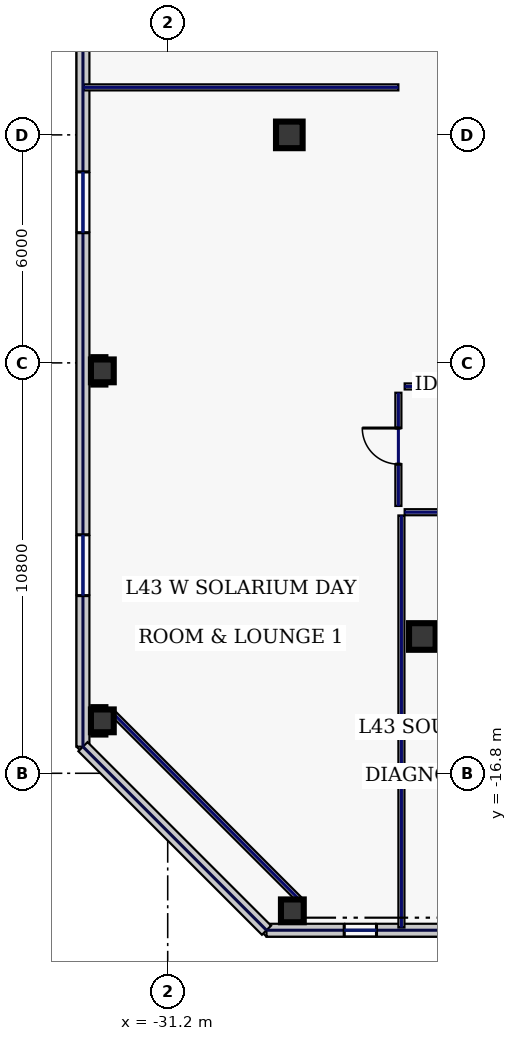
"""IFC4 building model, lengths in metres.
Left out: names, types, materials, properties, quantities, classifications, styles, units other than length and angle.
Written with IfcOpenShell. Run it as: python <this file> out.ifc"""

import sys

from ifc_helpers import new_model, si_unit, direction, frame, frame_2d, origin, origin_2d, place, context, subcontext, project, spatial, rectangle, hollow_rectangle, extrude, element, fill, save


model = new_model("IFC4")
c1 = context("Model", 3, precision=1e-05, world=origin(), true_north=direction((0.0, 1.0)))
c2 = subcontext(c1, "Body", "Model", "MODEL_VIEW")
j1 = project(units=[si_unit("LENGTHUNIT", "METRE"), si_unit("PLANEANGLEUNIT", "RADIAN")], contexts=[c1])
p1 = place(None, origin())
s1 = spatial("IfcSite", under=j1, at=p1, CompositionType="ELEMENT")
p2 = place(p1, origin())
s2 = spatial("IfcBuilding", under=s1, at=p2, CompositionType="ELEMENT")
p3 = place(p2, frame((0.0, 0.0, 188.2)))
s3 = spatial("IfcBuildingStorey", under=s2, at=p3, CompositionType="ELEMENT", Elevation=188.2)
for number, where, z_axis, x_axis in (
    (1, (-24.5, -13.2, 0.0), (0.0, 0.0, 1.0), (1.0, 0.0, 0.0)),
    (2, (-28.0, 0.0, 0.0), (0.0, 0.0, 1.0), (1.0, 0.0, 0.0)),
):
    element("IfcColumn", number, at=place(p3, frame(where, z_axis=z_axis, x_axis=x_axis)), inside=s3, PredefinedType="COLUMN", context=c2, shape_type="SweptSolid", body=[
        extrude(hollow_rectangle(XDim=0.7, YDim=0.7, WallThickness=0.032, at=origin_2d()), origin(), (0.0, 0.0, 1.0), 3.74),
    ])
for number, where, z_axis, x_axis in (
    (3, (-27.92, -20.42, 0.0), (0.0, 0.0, 1.0), (1.0, 0.0, 0.0)),
    (4, (-32.92, -6.21, 0.0), (0.0, 0.0, 1.0), (1.0, 0.0, 0.0)),
    (5, (-32.92, -15.42, 0.0), (0.0, 0.0, 1.0), (1.0, 0.0, 0.0)),
):
    element("IfcColumn", number, at=place(p3, frame(where, z_axis=z_axis, x_axis=x_axis)), inside=s3, PredefinedType="COLUMN", context=c2, shape_type="SweptSolid", body=[
        extrude(hollow_rectangle(XDim=0.6, YDim=0.6, WallThickness=0.028, at=origin_2d()), origin(), (0.0, 0.0, 1.0), 3.74),
    ])
p4 = place(p3, frame((-28.6, -20.93, 0.0), z_axis=(0.0, 0.0, 1.0), x_axis=(1.0, 0.0, 0.0)))
e6 = element("IfcWall", 6, at=p4, inside=s3, PredefinedType="STANDARD", context=c2, shape_type="SweptSolid", body=[
    extrude(rectangle(XDim=19.937, YDim=0.34, at=frame_2d((9.969, 0.0))), origin(), (0.0, 0.0, 1.0), 3.74),
])
p5 = place(p4, frame((2.044, 0.0, 0.8)))
e7 = element("IfcOpeningElement", 7, at=p5, cuts=e6, PredefinedType="OPENING", context=c2, shape_type="SweptSolid", body=[
    extrude(rectangle(XDim=0.85, YDim=1.85, at=frame_2d((0.425, 0.925))), frame((0.0, 0.18, 0.0), z_axis=(0.0, -1.0, 0.0), x_axis=(1.0, 0.0, 0.0)), (0.0, 0.0, 1.0), 0.36),
])
p6 = place(p4, frame((6.029, 0.0, 0.8)))
e8 = element("IfcOpeningElement", 8, at=p6, cuts=e6, PredefinedType="OPENING", context=c2, shape_type="SweptSolid", body=[
    extrude(rectangle(XDim=0.85, YDim=1.85, at=frame_2d((0.425, 0.925))), frame((0.0, 0.18, 0.0), z_axis=(0.0, -1.0, 0.0), x_axis=(1.0, 0.0, 0.0)), (0.0, 0.0, 1.0), 0.36),
])
p7 = place(p4, frame((10.707, 0.0, 0.8)))
e9 = element("IfcOpeningElement", 9, at=p7, cuts=e6, PredefinedType="OPENING", context=c2, shape_type="SweptSolid", body=[
    extrude(rectangle(XDim=1.95, YDim=2.1, at=frame_2d((0.975, 1.05))), frame((0.0, 0.18, 0.0), z_axis=(0.0, -1.0, 0.0), x_axis=(1.0, 0.0, 0.0)), (0.0, 0.0, 1.0), 0.36),
])
p8 = place(p4, frame((15.792, 0.0, 0.8)))
e10 = element("IfcOpeningElement", 10, at=p8, cuts=e6, PredefinedType="OPENING", context=c2, shape_type="SweptSolid", body=[
    extrude(rectangle(XDim=0.85, YDim=1.85, at=frame_2d((0.425, 0.925))), frame((0.0, 0.18, 0.0), z_axis=(0.0, -1.0, 0.0), x_axis=(1.0, 0.0, 0.0)), (0.0, 0.0, 1.0), 0.36),
])
p9 = place(p3, frame((-33.43, 22.1, 0.0), z_axis=(0.0, 0.0, 1.0), x_axis=(0.0, -1.0, 0.0)))
e11 = element("IfcWall", 11, at=p9, inside=s3, PredefinedType="STANDARD", context=c2, shape_type="SweptSolid", body=[
    extrude(rectangle(XDim=38.2, YDim=0.34, at=frame_2d((19.1, 0.0))), origin(), (0.0, 0.0, 1.0), 3.74),
])
p10 = place(p9, frame((3.975, 0.0, 0.58)))
e12 = element("IfcOpeningElement", 12, at=p10, cuts=e11, PredefinedType="OPENING", context=c2, shape_type="SweptSolid", body=[
    extrude(rectangle(XDim=1.6, YDim=2.3, at=frame_2d((0.8, 1.15))), frame((0.0, 0.18, 0.0), z_axis=(0.0, -1.0, 0.0), x_axis=(1.0, 0.0, 0.0)), (0.0, 0.0, 1.0), 0.36),
])
p11 = place(p9, frame((13.525, 0.0, 0.58)))
e13 = element("IfcOpeningElement", 13, at=p11, cuts=e11, PredefinedType="OPENING", context=c2, shape_type="SweptSolid", body=[
    extrude(rectangle(XDim=1.6, YDim=2.3, at=frame_2d((0.8, 1.15))), frame((0.0, 0.18, 0.0), z_axis=(0.0, -1.0, 0.0), x_axis=(1.0, 0.0, 0.0)), (0.0, 0.0, 1.0), 0.36),
])
p12 = place(p9, frame((23.075, 0.0, 0.58)))
e14 = element("IfcOpeningElement", 14, at=p12, cuts=e11, PredefinedType="OPENING", context=c2, shape_type="SweptSolid", body=[
    extrude(rectangle(XDim=1.6, YDim=2.3, at=frame_2d((0.8, 1.15))), frame((0.0, 0.18, 0.0), z_axis=(0.0, -1.0, 0.0), x_axis=(1.0, 0.0, 0.0)), (0.0, 0.0, 1.0), 0.36),
])
p13 = place(p9, frame((32.625, 0.0, 0.58)))
e15 = element("IfcOpeningElement", 15, at=p13, cuts=e11, PredefinedType="OPENING", context=c2, shape_type="SweptSolid", body=[
    extrude(rectangle(XDim=1.6, YDim=2.3, at=frame_2d((0.8, 1.15))), frame((0.0, 0.18, 0.0), z_axis=(0.0, -1.0, 0.0), x_axis=(1.0, 0.0, 0.0)), (0.0, 0.0, 1.0), 0.36),
])
p14 = place(p3, frame((-33.43, -16.1, 0.0), z_axis=(0.0, 0.0, 1.0), x_axis=(0.707106781187, -0.707106781187, 0.0)))
e16 = element("IfcWall", 16, at=p14, inside=s3, PredefinedType="STANDARD", context=c2, shape_type="SweptSolid", body=[
    extrude(rectangle(XDim=6.83, YDim=0.34, at=frame_2d((3.415, 0.0))), origin(), (0.0, 0.0, 1.0), 3.74),
])
p15 = place(p3, frame((-32.68, -15.18, 0.0), z_axis=(0.0, 0.0, 1.0), x_axis=(0.707106781187, -0.707106781187, 0.0)))
e17 = element("IfcWall", 17, at=p15, inside=s3, PredefinedType="PARTITIONING", context=c2, shape_type="SweptSolid", body=[
    extrude(rectangle(XDim=7.071, YDim=0.16, at=frame_2d((3.536, 0.0))), origin(), (0.0, 0.0, 1.0), 3.74),
])
p16 = place(p3, frame((-25.13, -9.765, 0.0), z_axis=(0.0, 0.0, 1.0), x_axis=(0.0, 1.0, 0.0)))
e18 = element("IfcWall", 18, at=p16, inside=s3, PredefinedType="PARTITIONING", context=c2, shape_type="SweptSolid", body=[
    extrude(rectangle(XDim=2.98, YDim=0.16, at=frame_2d((1.49, 0.0))), origin(), (0.0, 0.0, 1.0), 3.74),
])
p17 = place(p16, frame((1.1, 0.0, 0.0)))
e19 = element("IfcOpeningElement", 19, at=p17, cuts=e18, PredefinedType="OPENING", context=c2, shape_type="SweptSolid", body=[
    extrude(rectangle(XDim=0.95, YDim=2.2, at=frame_2d((0.475, 1.1))), frame((0.0, 0.09, 0.0), z_axis=(0.0, -1.0, 0.0), x_axis=(1.0, 0.0, 0.0)), (0.0, 0.0, 1.0), 0.18),
])
p18 = place(p3, frame((-24.965, -6.62, 0.0), z_axis=(0.0, 0.0, 1.0), x_axis=(1.0, 0.0, 0.0)))
e20 = element("IfcWall", 20, at=p18, inside=s3, PredefinedType="PARTITIONING", context=c2, shape_type="SweptSolid", body=[
    extrude(rectangle(XDim=14.335, YDim=0.16, at=frame_2d((7.167, 0.0))), origin(), (0.0, 0.0, 1.0), 3.74),
])
p19 = place(p3, frame((24.965, -9.93, 0.0), z_axis=(0.0, 0.0, 1.0), x_axis=(-1.0, 0.0, 0.0)))
e21 = element("IfcWall", 21, at=p19, inside=s3, PredefinedType="PARTITIONING", context=c2, shape_type="SweptSolid", body=[
    extrude(rectangle(XDim=49.93, YDim=0.16, at=frame_2d((24.965, 0.0))), origin(), (0.0, 0.0, 1.0), 3.74),
])
p20 = place(p19, frame((47.106, 0.0, 0.0)))
e22 = element("IfcOpeningElement", 22, at=p20, cuts=e21, PredefinedType="OPENING", context=c2, shape_type="SweptSolid", body=[
    extrude(rectangle(XDim=0.95, YDim=2.2, at=frame_2d((0.475, 1.1))), frame((0.0, 0.09, 0.0), z_axis=(0.0, -1.0, 0.0), x_axis=(1.0, 0.0, 0.0)), (0.0, 0.0, 1.0), 0.18),
])
p21 = place(p19, frame((41.925, 0.0, 0.0)))
e23 = element("IfcOpeningElement", 23, at=p21, cuts=e21, PredefinedType="OPENING", context=c2, shape_type="SweptSolid", body=[
    extrude(rectangle(XDim=0.95, YDim=2.2, at=frame_2d((0.475, 1.1))), frame((0.0, 0.09, 0.0), z_axis=(0.0, -1.0, 0.0), x_axis=(1.0, 0.0, 0.0)), (0.0, 0.0, 1.0), 0.18),
])
p22 = place(p19, frame((34.8, 0.0, 0.0)))
e24 = element("IfcOpeningElement", 24, at=p22, cuts=e21, PredefinedType="OPENING", context=c2, shape_type="SweptSolid", body=[
    extrude(rectangle(XDim=1.3, YDim=2.2, at=frame_2d((0.65, 1.1))), frame((0.0, 0.09, 0.0), z_axis=(0.0, -1.0, 0.0), x_axis=(1.0, 0.0, 0.0)), (0.0, 0.0, 1.0), 0.18),
])
p23 = place(p19, frame((28.25, 0.0, 0.0)))
e25 = element("IfcOpeningElement", 25, at=p23, cuts=e21, PredefinedType="OPENING", context=c2, shape_type="SweptSolid", body=[
    extrude(rectangle(XDim=1.05, YDim=2.2, at=frame_2d((0.525, 1.1))), frame((0.0, 0.09, 0.0), z_axis=(0.0, -1.0, 0.0), x_axis=(1.0, 0.0, 0.0)), (0.0, 0.0, 1.0), 0.18),
])
p24 = place(p19, frame((21.925, 0.0, 0.0)))
e26 = element("IfcOpeningElement", 26, at=p24, cuts=e21, PredefinedType="OPENING", context=c2, shape_type="SweptSolid", body=[
    extrude(rectangle(XDim=0.95, YDim=2.2, at=frame_2d((0.475, 1.1))), frame((0.0, 0.09, 0.0), z_axis=(0.0, -1.0, 0.0), x_axis=(1.0, 0.0, 0.0)), (0.0, 0.0, 1.0), 0.18),
])
p25 = place(p19, frame((16.05, 0.0, 0.0)))
e27 = element("IfcOpeningElement", 27, at=p25, cuts=e21, PredefinedType="OPENING", context=c2, shape_type="SweptSolid", body=[
    extrude(rectangle(XDim=0.95, YDim=2.2, at=frame_2d((0.475, 1.1))), frame((0.0, 0.09, 0.0), z_axis=(0.0, -1.0, 0.0), x_axis=(1.0, 0.0, 0.0)), (0.0, 0.0, 1.0), 0.18),
])
p26 = place(p19, frame((9.575, 0.0, 0.0)))
e28 = element("IfcOpeningElement", 28, at=p26, cuts=e21, PredefinedType="OPENING", context=c2, shape_type="SweptSolid", body=[
    extrude(rectangle(XDim=0.95, YDim=2.2, at=frame_2d((0.475, 1.1))), frame((0.0, 0.09, 0.0), z_axis=(0.0, -1.0, 0.0), x_axis=(1.0, 0.0, 0.0)), (0.0, 0.0, 1.0), 0.18),
])
p27 = place(p19, frame((2.519, 0.0, 0.0)))
e29 = element("IfcOpeningElement", 29, at=p27, cuts=e21, PredefinedType="OPENING", context=c2, shape_type="SweptSolid", body=[
    extrude(rectangle(XDim=1.3, YDim=2.2, at=frame_2d((0.65, 1.1))), frame((0.0, 0.09, 0.0), z_axis=(0.0, -1.0, 0.0), x_axis=(1.0, 0.0, 0.0)), (0.0, 0.0, 1.0), 0.18),
])
p28 = place(p3, frame((-25.05, -20.86, 0.0), z_axis=(0.0, 0.0, 1.0), x_axis=(0.0, 1.0, 0.0)))
e30 = element("IfcWall", 30, at=p28, inside=s3, PredefinedType="PARTITIONING", context=c2, shape_type="SweptSolid", body=[
    extrude(rectangle(XDim=10.845, YDim=0.16, at=frame_2d((5.423, 0.0))), origin(), (0.0, 0.0, 1.0), 3.74),
])
p29 = place(p3, frame((-33.41, 1.25, 0.0), z_axis=(0.0, 0.0, 1.0), x_axis=(1.0, 0.0, 0.0)))
e31 = element("IfcWall", 31, at=p29, inside=s3, PredefinedType="PARTITIONING", context=c2, shape_type="SweptSolid", body=[
    extrude(rectangle(XDim=8.28, YDim=0.16, at=frame_2d((4.14, 0.0))), origin(), (0.0, 0.0, 1.0), 3.74),
])
p30 = place(p5, origin())
e32 = element("IfcWindow", 32, at=p30, inside=s3, PartitioningType="SINGLE_PANEL", PredefinedType="WINDOW", context=c2, shape_type="SweptSolid", body=[
    extrude(rectangle(XDim=0.85, YDim=1.85, at=frame_2d((0.425, 0.925))), frame((0.0, 0.03, 0.0), z_axis=(0.0, -1.0, 0.0), x_axis=(1.0, 0.0, 0.0)), (0.0, 0.0, 1.0), 0.06),
])
fill(e7, e32)
p31 = place(p12, origin())
e33 = element("IfcWindow", 33, at=p31, inside=s3, PartitioningType="SINGLE_PANEL", PredefinedType="WINDOW", context=c2, shape_type="SweptSolid", body=[
    extrude(rectangle(XDim=1.6, YDim=2.3, at=frame_2d((0.8, 1.15))), frame((0.0, 0.03, 0.0), z_axis=(0.0, -1.0, 0.0), x_axis=(1.0, 0.0, 0.0)), (0.0, 0.0, 1.0), 0.06),
])
fill(e14, e33)
p32 = place(p13, origin())
e34 = element("IfcWindow", 34, at=p32, inside=s3, PartitioningType="SINGLE_PANEL", PredefinedType="WINDOW", context=c2, shape_type="SweptSolid", body=[
    extrude(rectangle(XDim=1.6, YDim=2.3, at=frame_2d((0.8, 1.15))), frame((0.0, 0.03, 0.0), z_axis=(0.0, -1.0, 0.0), x_axis=(1.0, 0.0, 0.0)), (0.0, 0.0, 1.0), 0.06),
])
fill(e15, e34)
p33 = place(p17, origin())
e35 = element("IfcDoor", 35, at=p33, inside=s3, OperationType="SINGLE_SWING_RIGHT", PredefinedType="DOOR", context=c2, shape_type="SweptSolid", body=[
    extrude(rectangle(XDim=0.95, YDim=2.2, at=frame_2d((0.475, 1.1))), frame((0.0, 0.025, 0.0), z_axis=(0.0, -1.0, 0.0), x_axis=(1.0, 0.0, 0.0)), (0.0, 0.0, 1.0), 0.05),
])
fill(e19, e35)
save(model, sys.argv[1])
